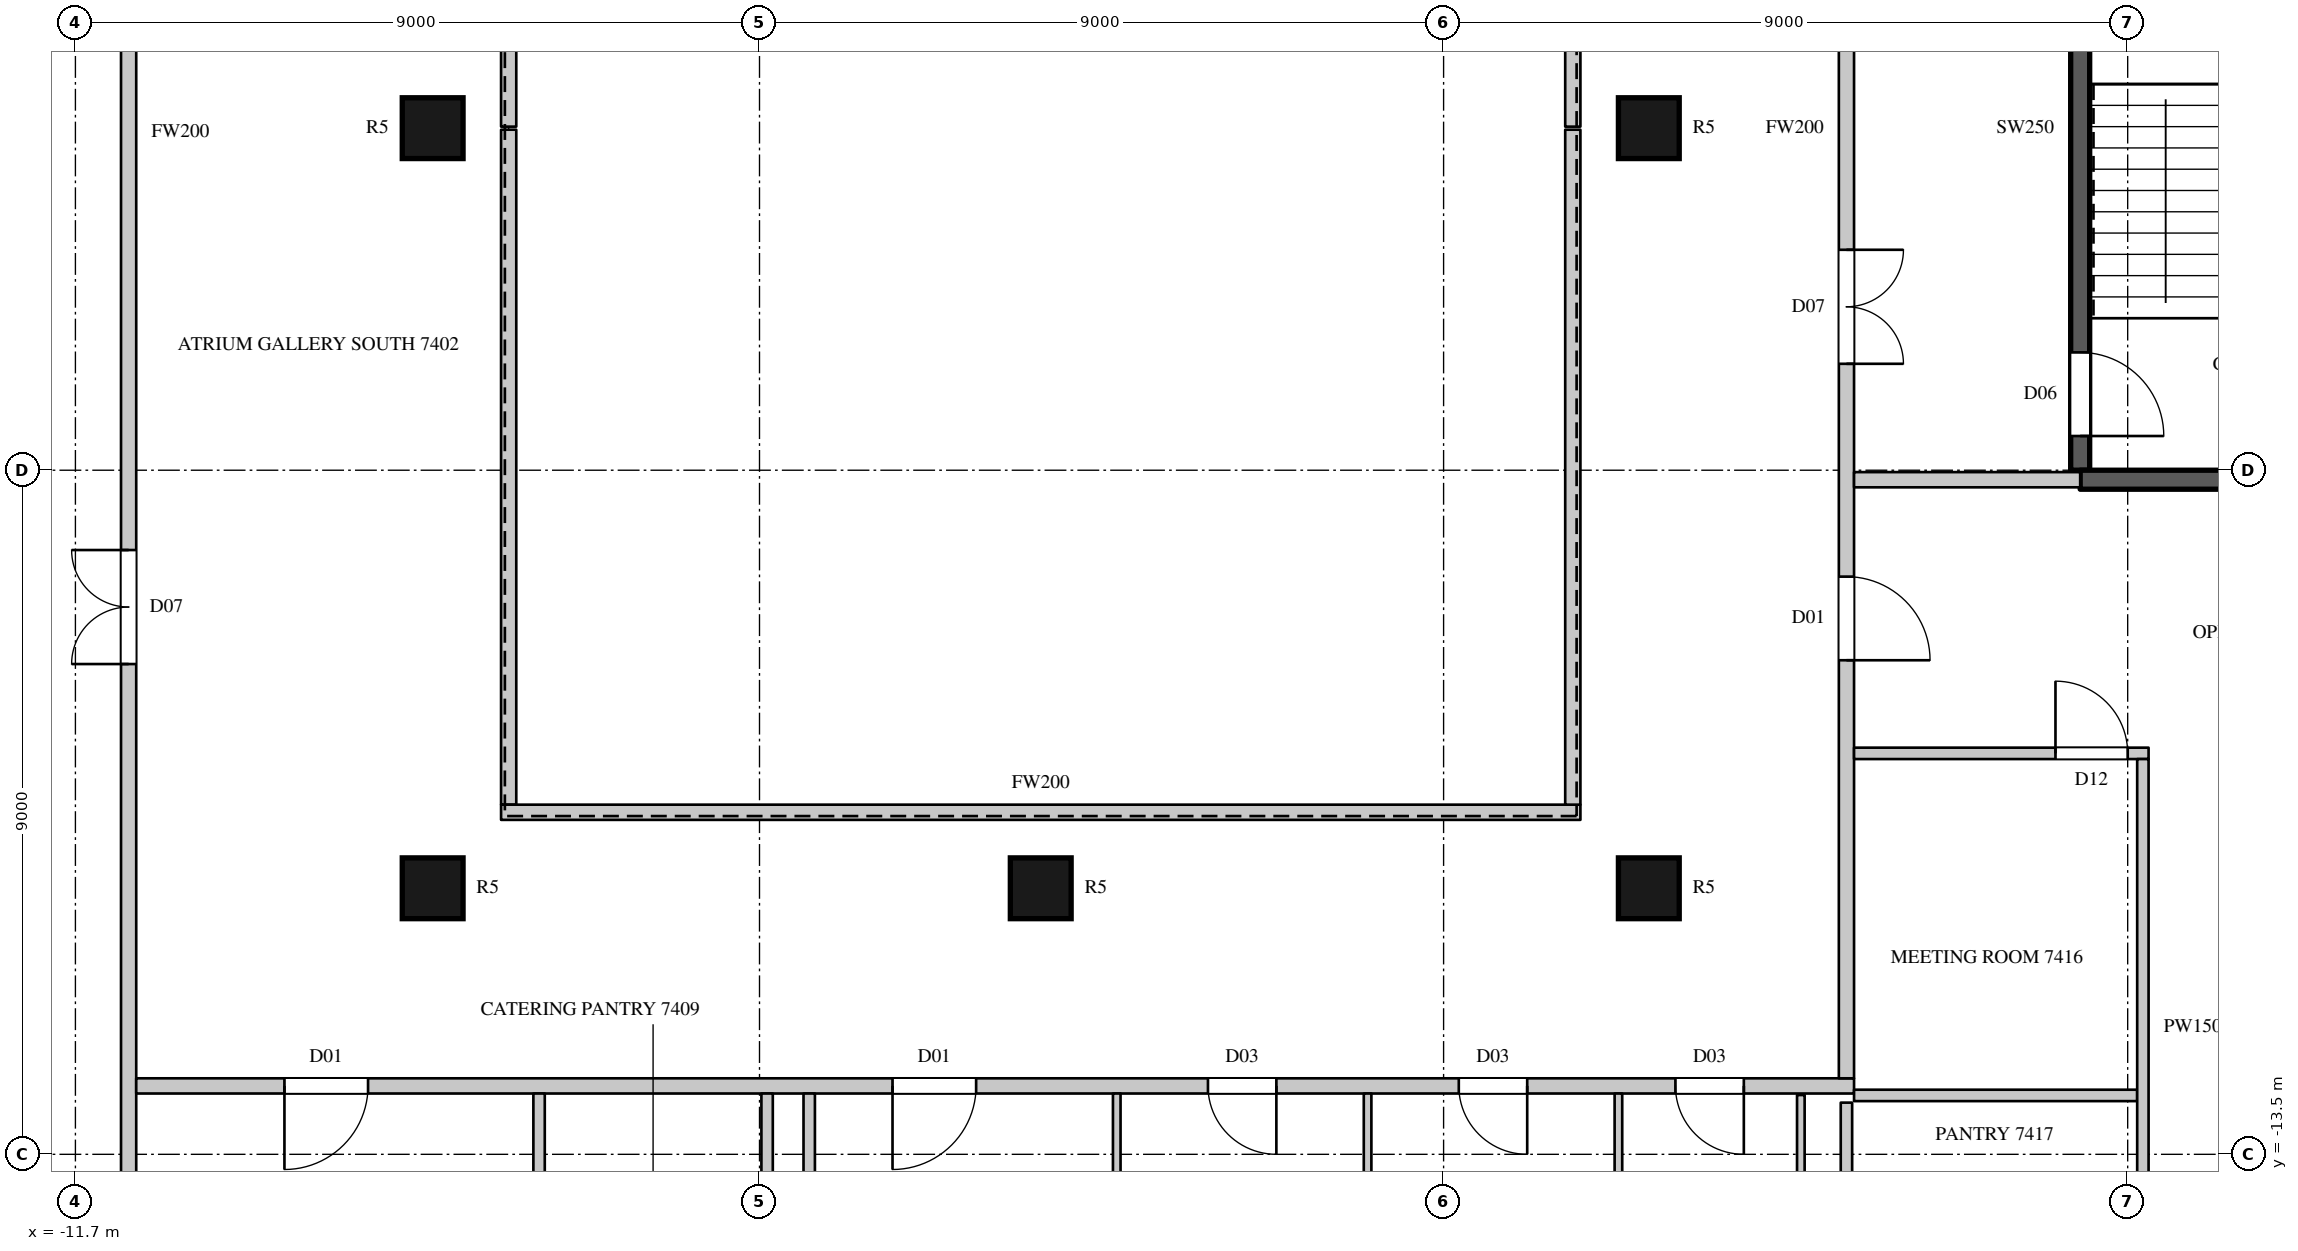
"""IFC4 building model, lengths in metres.
Left out: names, types, materials, properties, quantities, classifications, styles, units other than length and angle.
Written with IfcOpenShell. Run it as: python <this file> out.ifc"""

import sys

from ifc_helpers import new_model, si_unit, direction, frame, frame_2d, origin, origin_2d, place, context, subcontext, project, spatial, rectangle, circle, extrude, element, fill, save


model = new_model("IFC4")
c1 = context("Model", 3, precision=1e-05, world=origin(), true_north=direction((0.0, 1.0)))
c2 = subcontext(c1, "Body", "Model", "MODEL_VIEW")
j1 = project(units=[si_unit("LENGTHUNIT", "METRE"), si_unit("PLANEANGLEUNIT", "RADIAN")], contexts=[c1])
p1 = place(None, origin())
s1 = spatial("IfcSite", under=j1, at=p1, CompositionType="ELEMENT")
p2 = place(p1, origin())
s2 = spatial("IfcBuilding", under=s1, at=p2, CompositionType="ELEMENT")
p3 = place(p2, frame((0.0, 0.0, 325.4)))
s3 = spatial("IfcBuildingStorey", under=s2, at=p3, CompositionType="ELEMENT", Elevation=325.4)
for number, where, z_axis, x_axis in (
    (1, (-7.0, -10.0, 0.0), (0.0, 0.0, 1.0), (1.0, 0.0, 0.0)),
    (2, (-7.0, 0.0, 0.0), (0.0, 0.0, 1.0), (1.0, 0.0, 0.0)),
    (3, (1.0, -10.0, 0.0), (0.0, 0.0, 1.0), (1.0, 0.0, 0.0)),
    (4, (9.0, -10.0, 0.0), (0.0, 0.0, 1.0), (1.0, 0.0, 0.0)),
    (5, (9.0, 0.0, 0.0), (0.0, 0.0, 1.0), (1.0, 0.0, 0.0)),
):
    element("IfcColumn", number, at=place(p3, frame(where, z_axis=z_axis, x_axis=x_axis)), inside=s3, PredefinedType="COLUMN", context=c2, shape_type="SweptSolid", body=[
        extrude(circle(Radius=0.4, at=origin_2d()), origin(), (0.0, 0.0, 1.0), 4.1),
    ])
p4 = place(p3, frame((-11.0, -14.8, 0.0), z_axis=(0.0, 0.0, 1.0), x_axis=(0.0, 1.0, 0.0)))
e6 = element("IfcWall", 6, at=p4, inside=s3, PredefinedType="PARTITIONING", context=c2, shape_type="SweptSolid", body=[
    extrude(rectangle(XDim=29.5, YDim=0.2, at=frame_2d((14.75, 0.0))), origin(), (0.0, 0.0, 1.0), 3.8),
])
p5 = place(p4, frame((7.75, 0.0, 0.0)))
e7 = element("IfcOpeningElement", 7, at=p5, cuts=e6, PredefinedType="OPENING", context=c2, shape_type="SweptSolid", body=[
    extrude(rectangle(XDim=1.5, YDim=2.4, at=frame_2d((0.75, 1.2))), frame((0.0, 0.11, 0.0), z_axis=(0.0, -1.0, 0.0), x_axis=(1.0, 0.0, 0.0)), (0.0, 0.0, 1.0), 0.22),
])
p6 = place(p3, frame((-10.9, -12.6, 0.0), z_axis=(0.0, 0.0, 1.0), x_axis=(1.0, 0.0, 0.0)))
e8 = element("IfcWall", 8, at=p6, inside=s3, PredefinedType="PARTITIONING", context=c2, shape_type="SweptSolid", body=[
    extrude(rectangle(XDim=22.6, YDim=0.2, at=frame_2d((11.3, 0.0))), origin(), (0.0, 0.0, 1.0), 3.8),
])
p7 = place(p6, frame((14.1, 0.0, 0.0)))
e9 = element("IfcOpeningElement", 9, at=p7, cuts=e8, PredefinedType="OPENING", context=c2, shape_type="SweptSolid", body=[
    extrude(rectangle(XDim=0.9, YDim=2.2, at=frame_2d((0.45, 1.1))), frame((0.0, 0.11, 0.0), z_axis=(0.0, -1.0, 0.0), x_axis=(1.0, 0.0, 0.0)), (0.0, 0.0, 1.0), 0.22),
])
p8 = place(p6, frame((17.4, 0.0, 0.0)))
e10 = element("IfcOpeningElement", 10, at=p8, cuts=e8, PredefinedType="OPENING", context=c2, shape_type="SweptSolid", body=[
    extrude(rectangle(XDim=0.9, YDim=2.2, at=frame_2d((0.45, 1.1))), frame((0.0, 0.11, 0.0), z_axis=(0.0, -1.0, 0.0), x_axis=(1.0, 0.0, 0.0)), (0.0, 0.0, 1.0), 0.22),
])
p9 = place(p6, frame((20.25, 0.0, 0.0)))
e11 = element("IfcOpeningElement", 11, at=p9, cuts=e8, PredefinedType="OPENING", context=c2, shape_type="SweptSolid", body=[
    extrude(rectangle(XDim=0.9, YDim=2.2, at=frame_2d((0.45, 1.1))), frame((0.0, 0.11, 0.0), z_axis=(0.0, -1.0, 0.0), x_axis=(1.0, 0.0, 0.0)), (0.0, 0.0, 1.0), 0.22),
])
p10 = place(p6, frame((1.95, 0.0, 0.0)))
e12 = element("IfcOpeningElement", 12, at=p10, cuts=e8, PredefinedType="OPENING", context=c2, shape_type="SweptSolid", body=[
    extrude(rectangle(XDim=1.1, YDim=2.4, at=frame_2d((0.55, 1.2))), frame((0.0, 0.11, 0.0), z_axis=(0.0, -1.0, 0.0), x_axis=(1.0, 0.0, 0.0)), (0.0, 0.0, 1.0), 0.22),
])
p11 = place(p6, frame((9.95, 0.0, 0.0)))
e13 = element("IfcOpeningElement", 13, at=p11, cuts=e8, PredefinedType="OPENING", context=c2, shape_type="SweptSolid", body=[
    extrude(rectangle(XDim=1.1, YDim=2.4, at=frame_2d((0.55, 1.2))), frame((0.0, 0.11, 0.0), z_axis=(0.0, -1.0, 0.0), x_axis=(1.0, 0.0, 0.0)), (0.0, 0.0, 1.0), 0.22),
])
p12 = place(p3, frame((-6.0, -8.9, 0.0), z_axis=(0.0, 0.0, 1.0), x_axis=(0.0, 1.0, 0.0)))
e14 = element("IfcWall", 14, at=p12, inside=s3, PredefinedType="PARTITIONING", context=c2, shape_type="SweptSolid", body=[
    extrude(rectangle(XDim=8.88, YDim=0.2, at=frame_2d((4.44, 0.0))), origin(), (0.0, 0.0, 1.0), 3.8),
])
p13 = place(p3, frame((-6.1, -9.0, 0.0), z_axis=(0.0, 0.0, 1.0), x_axis=(1.0, 0.0, 0.0)))
e15 = element("IfcWall", 15, at=p13, inside=s3, PredefinedType="PARTITIONING", context=c2, shape_type="SweptSolid", body=[
    extrude(rectangle(XDim=14.2, YDim=0.2, at=frame_2d((7.1, 0.0))), origin(), (0.0, 0.0, 1.0), 3.8),
])
for number, where, z_axis, x_axis in (
    (16, (-6.0, 0.02, 0.0), (0.0, 0.0, 1.0), (0.0, 1.0, 0.0)),
    (17, (8.0, -8.9, 0.0), (0.0, 0.0, 1.0), (0.0, 1.0, 0.0)),
    (18, (8.0, 0.02, 0.0), (0.0, 0.0, 1.0), (0.0, 1.0, 0.0)),
):
    element("IfcWall", number, at=place(p3, frame(where, z_axis=z_axis, x_axis=x_axis)), inside=s3, PredefinedType="PARTITIONING", context=c2, shape_type="SweptSolid", body=[
        extrude(rectangle(XDim=8.88, YDim=0.2, at=frame_2d((4.44, 0.0))), origin(), (0.0, 0.0, 1.0), 3.8),
    ])
p14 = place(p3, frame((11.6, -12.5, 0.0), z_axis=(0.0, 0.0, 1.0), x_axis=(0.0, 1.0, 0.0)))
e19 = element("IfcWall", 19, at=p14, inside=s3, PredefinedType="PARTITIONING", context=c2, shape_type="SweptSolid", body=[
    extrude(rectangle(XDim=25.0, YDim=0.2, at=frame_2d((12.5, 0.0))), origin(), (0.0, 0.0, 1.0), 3.8),
])
p15 = place(p14, frame((9.4, 0.0, 0.0)))
e20 = element("IfcOpeningElement", 20, at=p15, cuts=e19, PredefinedType="OPENING", context=c2, shape_type="SweptSolid", body=[
    extrude(rectangle(XDim=1.5, YDim=2.4, at=frame_2d((0.75, 1.2))), frame((0.0, 0.11, 0.0), z_axis=(0.0, -1.0, 0.0), x_axis=(1.0, 0.0, 0.0)), (0.0, 0.0, 1.0), 0.22),
])
p16 = place(p14, frame((5.5, 0.0, 0.0)))
e21 = element("IfcOpeningElement", 21, at=p16, cuts=e19, PredefinedType="OPENING", context=c2, shape_type="SweptSolid", body=[
    extrude(rectangle(XDim=1.1, YDim=2.4, at=frame_2d((0.55, 1.2))), frame((0.0, 0.11, 0.0), z_axis=(0.0, -1.0, 0.0), x_axis=(1.0, 0.0, 0.0)), (0.0, 0.0, 1.0), 0.22),
])
p17 = place(p3, frame((11.7, -4.625, 0.0), z_axis=(0.0, 0.0, 1.0), x_axis=(1.0, 0.0, 0.0)))
e22 = element("IfcWall", 22, at=p17, inside=s3, PredefinedType="PARTITIONING", context=c2, shape_type="SweptSolid", body=[
    extrude(rectangle(XDim=2.975, YDim=0.2, at=frame_2d((1.488, 0.0))), origin(), (0.0, 0.0, 1.0), 3.8),
])
p18 = place(p3, frame((-5.6, -16.725, 0.0), z_axis=(0.0, 0.0, 1.0), x_axis=(0.0, 1.0, 0.0)))
e23 = element("IfcWall", 23, at=p18, inside=s3, PredefinedType="PARTITIONING", context=c2, shape_type="SweptSolid", body=[
    extrude(rectangle(XDim=4.025, YDim=0.15, at=frame_2d((2.013, 0.0))), origin(), (0.0, 0.0, 1.0), 3.8),
])
p19 = place(p18, frame((1.55, 0.0, 0.0)))
e24 = element("IfcOpeningElement", 24, at=p19, cuts=e23, PredefinedType="OPENING", context=c2, shape_type="SweptSolid", body=[
    extrude(rectangle(XDim=0.95, YDim=2.2, at=frame_2d((0.475, 1.1))), frame((0.0, 0.085, 0.0), z_axis=(0.0, -1.0, 0.0), x_axis=(1.0, 0.0, 0.0)), (0.0, 0.0, 1.0), 0.17),
])
p20 = place(p3, frame((-2.6, -16.725, 0.0), z_axis=(0.0, 0.0, 1.0), x_axis=(0.0, 1.0, 0.0)))
e25 = element("IfcWall", 25, at=p20, inside=s3, PredefinedType="PARTITIONING", context=c2, shape_type="SweptSolid", body=[
    extrude(rectangle(XDim=4.025, YDim=0.15, at=frame_2d((2.013, 0.0))), origin(), (0.0, 0.0, 1.0), 3.8),
])
p21 = place(p3, frame((-2.046, -23.542, 0.0), z_axis=(0.0, 0.0, 1.0), x_axis=(0.0, 1.0, 0.0)))
e26 = element("IfcWall", 26, at=p21, inside=s3, PredefinedType="PARTITIONING", context=c2, shape_type="SweptSolid", body=[
    extrude(rectangle(XDim=10.842, YDim=0.15, at=frame_2d((5.421, 0.0))), origin(), (0.0, 0.0, 1.0), 3.8),
])
p22 = place(p3, frame((11.6, -15.425, 0.0), z_axis=(0.0, 0.0, 1.0), x_axis=(0.0, 1.0, 0.0)))
e27 = element("IfcWall", 27, at=p22, inside=s3, PredefinedType="PARTITIONING", context=c2, shape_type="SweptSolid", body=[
    extrude(rectangle(XDim=2.605, YDim=0.15, at=frame_2d((1.302, 0.0))), origin(), (0.0, 0.0, 1.0), 3.8),
])
p23 = place(p3, frame((11.7, -12.725, 0.0), z_axis=(0.0, 0.0, 1.0), x_axis=(1.0, 0.0, 0.0)))
e28 = element("IfcWall", 28, at=p23, inside=s3, PredefinedType="PARTITIONING", context=c2, shape_type="SweptSolid", body=[
    extrude(rectangle(XDim=3.725, YDim=0.15, at=frame_2d((1.863, 0.0))), origin(), (0.0, 0.0, 1.0), 3.8),
])
p24 = place(p3, frame((11.7, -8.225, 0.0), z_axis=(0.0, 0.0, 1.0), x_axis=(1.0, 0.0, 0.0)))
e29 = element("IfcWall", 29, at=p24, inside=s3, PredefinedType="PARTITIONING", context=c2, shape_type="SweptSolid", body=[
    extrude(rectangle(XDim=3.875, YDim=0.15, at=frame_2d((1.938, 0.0))), origin(), (0.0, 0.0, 1.0), 3.8),
])
p25 = place(p24, frame((2.65, 0.0, 0.0)))
e30 = element("IfcOpeningElement", 30, at=p25, cuts=e29, PredefinedType="OPENING", context=c2, shape_type="SweptSolid", body=[
    extrude(rectangle(XDim=0.95, YDim=2.2, at=frame_2d((0.475, 1.1))), frame((0.0, 0.085, 0.0), z_axis=(0.0, -1.0, 0.0), x_axis=(1.0, 0.0, 0.0)), (0.0, 0.0, 1.0), 0.17),
])
p26 = place(p3, frame((15.5, -15.35, 0.0), z_axis=(0.0, 0.0, 1.0), x_axis=(0.0, 1.0, 0.0)))
e31 = element("IfcWall", 31, at=p26, inside=s3, PredefinedType="PARTITIONING", context=c2, shape_type="SweptSolid", body=[
    extrude(rectangle(XDim=7.05, YDim=0.15, at=frame_2d((3.525, 0.0))), origin(), (0.0, 0.0, 1.0), 3.8),
])
p27 = place(p3, frame((14.675, -4.5, 0.0), z_axis=(0.0, 0.0, 1.0), x_axis=(0.0, 1.0, 0.0)))
e32 = element("IfcWall", 32, at=p27, inside=s3, PredefinedType="SHEAR", context=c2, shape_type="SweptSolid", body=[
    extrude(rectangle(XDim=9.0, YDim=0.25, at=frame_2d((4.5, 0.0))), origin(), (0.0, 0.0, 1.0), 3.8),
])
p28 = place(p27, frame((0.45, 0.0, 0.0)))
e33 = element("IfcOpeningElement", 33, at=p28, cuts=e32, PredefinedType="OPENING", context=c2, shape_type="SweptSolid", body=[
    extrude(rectangle(XDim=1.1, YDim=2.2, at=frame_2d((0.55, 1.1))), frame((0.0, 0.135, 0.0), z_axis=(0.0, -1.0, 0.0), x_axis=(1.0, 0.0, 0.0)), (0.0, 0.0, 1.0), 0.27),
])
p29 = place(p3, frame((14.675, -4.625, 0.0), z_axis=(0.0, 0.0, 1.0), x_axis=(1.0, 0.0, 0.0)))
e34 = element("IfcWall", 34, at=p29, inside=s3, PredefinedType="SHEAR", context=c2, shape_type="SweptSolid", body=[
    extrude(rectangle(XDim=4.45, YDim=0.25, at=frame_2d((2.225, 0.0))), origin(), (0.0, 0.0, 1.0), 3.8),
])
p30 = place(p3, frame((2.0, -23.344, 0.0), z_axis=(0.0, 0.0, 1.0), x_axis=(0.0, 1.0, 0.0)))
e35 = element("IfcWall", 35, at=p30, inside=s3, PredefinedType="PARTITIONING", context=c2, shape_type="SweptSolid", body=[
    extrude(rectangle(XDim=10.644, YDim=0.1, at=frame_2d((5.322, 0.0))), origin(), (0.0, 0.0, 1.0), 3.8),
])
p31 = place(p3, frame((5.3, -22.25, 0.0), z_axis=(0.0, 0.0, 1.0), x_axis=(0.0, 1.0, 0.0)))
e36 = element("IfcWall", 36, at=p31, inside=s3, PredefinedType="PARTITIONING", context=c2, shape_type="SweptSolid", body=[
    extrude(rectangle(XDim=9.55, YDim=0.1, at=frame_2d((4.775, 0.0))), origin(), (0.0, 0.0, 1.0), 3.8),
])
p32 = place(p3, frame((8.6, -21.576, 0.0), z_axis=(0.0, 0.0, 1.0), x_axis=(0.0, 1.0, 0.0)))
e37 = element("IfcWall", 37, at=p32, inside=s3, PredefinedType="PARTITIONING", context=c2, shape_type="SweptSolid", body=[
    extrude(rectangle(XDim=8.876, YDim=0.1, at=frame_2d((4.438, 0.0))), origin(), (0.0, 0.0, 1.0), 3.8),
])
p33 = place(p3, frame((11.0, -20.721, 0.0), z_axis=(0.0, 0.0, 1.0), x_axis=(0.0, 1.0, 0.0)))
e38 = element("IfcWall", 38, at=p33, inside=s3, PredefinedType="PARTITIONING", context=c2, shape_type="SweptSolid", body=[
    extrude(rectangle(XDim=8.001, YDim=0.1, at=frame_2d((4.001, 0.0))), origin(), (0.0, 0.0, 1.0), 3.8),
])
p34 = place(p5, origin())
e39 = element("IfcDoor", 39, at=p34, inside=s3, OperationType="DOUBLE_DOOR_SINGLE_SWING", PredefinedType="DOOR", context=c2, shape_type="SweptSolid", body=[
    extrude(rectangle(XDim=1.5, YDim=2.4, at=frame_2d((0.75, 1.2))), frame((0.0, 0.025, 0.0), z_axis=(0.0, -1.0, 0.0), x_axis=(1.0, 0.0, 0.0)), (0.0, 0.0, 1.0), 0.05),
])
fill(e7, e39)
p35 = place(p15, origin())
e40 = element("IfcDoor", 40, at=p35, inside=s3, OperationType="DOUBLE_DOOR_SINGLE_SWING", PredefinedType="DOOR", context=c2, shape_type="SweptSolid", body=[
    extrude(rectangle(XDim=1.5, YDim=2.4, at=frame_2d((0.75, 1.2))), frame((0.0, 0.025, 0.0), z_axis=(0.0, -1.0, 0.0), x_axis=(1.0, 0.0, 0.0)), (0.0, 0.0, 1.0), 0.05),
])
fill(e20, e40)
p36 = place(p7, origin())
e41 = element("IfcDoor", 41, at=p36, inside=s3, OperationType="SINGLE_SWING_LEFT", PredefinedType="DOOR", context=c2, shape_type="SweptSolid", body=[
    extrude(rectangle(XDim=0.9, YDim=2.2, at=frame_2d((0.45, 1.1))), frame((0.0, 0.025, 0.0), z_axis=(0.0, -1.0, 0.0), x_axis=(1.0, 0.0, 0.0)), (0.0, 0.0, 1.0), 0.05),
])
fill(e9, e41)
p37 = place(p8, origin())
e42 = element("IfcDoor", 42, at=p37, inside=s3, OperationType="SINGLE_SWING_LEFT", PredefinedType="DOOR", context=c2, shape_type="SweptSolid", body=[
    extrude(rectangle(XDim=0.9, YDim=2.2, at=frame_2d((0.45, 1.1))), frame((0.0, 0.025, 0.0), z_axis=(0.0, -1.0, 0.0), x_axis=(1.0, 0.0, 0.0)), (0.0, 0.0, 1.0), 0.05),
])
fill(e10, e42)
p38 = place(p9, origin())
e43 = element("IfcDoor", 43, at=p38, inside=s3, OperationType="SINGLE_SWING_LEFT", PredefinedType="DOOR", context=c2, shape_type="SweptSolid", body=[
    extrude(rectangle(XDim=0.9, YDim=2.2, at=frame_2d((0.45, 1.1))), frame((0.0, 0.025, 0.0), z_axis=(0.0, -1.0, 0.0), x_axis=(1.0, 0.0, 0.0)), (0.0, 0.0, 1.0), 0.05),
])
fill(e11, e43)
p39 = place(p10, origin())
e44 = element("IfcDoor", 44, at=p39, inside=s3, OperationType="SINGLE_SWING_RIGHT", PredefinedType="DOOR", context=c2, shape_type="SweptSolid", body=[
    extrude(rectangle(XDim=1.1, YDim=2.4, at=frame_2d((0.55, 1.2))), frame((0.0, 0.025, 0.0), z_axis=(0.0, -1.0, 0.0), x_axis=(1.0, 0.0, 0.0)), (0.0, 0.0, 1.0), 0.05),
])
fill(e12, e44)
p40 = place(p11, origin())
e45 = element("IfcDoor", 45, at=p40, inside=s3, OperationType="SINGLE_SWING_RIGHT", PredefinedType="DOOR", context=c2, shape_type="SweptSolid", body=[
    extrude(rectangle(XDim=1.1, YDim=2.4, at=frame_2d((0.55, 1.2))), frame((0.0, 0.025, 0.0), z_axis=(0.0, -1.0, 0.0), x_axis=(1.0, 0.0, 0.0)), (0.0, 0.0, 1.0), 0.05),
])
fill(e13, e45)
p41 = place(p16, origin())
e46 = element("IfcDoor", 46, at=p41, inside=s3, OperationType="SINGLE_SWING_RIGHT", PredefinedType="DOOR", context=c2, shape_type="SweptSolid", body=[
    extrude(rectangle(XDim=1.1, YDim=2.4, at=frame_2d((0.55, 1.2))), frame((0.0, 0.025, 0.0), z_axis=(0.0, -1.0, 0.0), x_axis=(1.0, 0.0, 0.0)), (0.0, 0.0, 1.0), 0.05),
])
fill(e21, e46)
p42 = place(p25, origin())
e47 = element("IfcDoor", 47, at=p42, inside=s3, OperationType="SINGLE_SWING_LEFT", PredefinedType="DOOR", context=c2, shape_type="SweptSolid", body=[
    extrude(rectangle(XDim=0.95, YDim=2.2, at=frame_2d((0.475, 1.1))), frame((0.0, 0.025, 0.0), z_axis=(0.0, -1.0, 0.0), x_axis=(1.0, 0.0, 0.0)), (0.0, 0.0, 1.0), 0.05),
])
fill(e30, e47)
p43 = place(p28, origin())
e48 = element("IfcDoor", 48, at=p43, inside=s3, OperationType="SINGLE_SWING_RIGHT", PredefinedType="DOOR", context=c2, shape_type="SweptSolid", body=[
    extrude(rectangle(XDim=1.1, YDim=2.2, at=frame_2d((0.55, 1.1))), frame((0.0, 0.025, 0.0), z_axis=(0.0, -1.0, 0.0), x_axis=(1.0, 0.0, 0.0)), (0.0, 0.0, 1.0), 0.05),
])
fill(e33, e48)
save(model, sys.argv[1])
